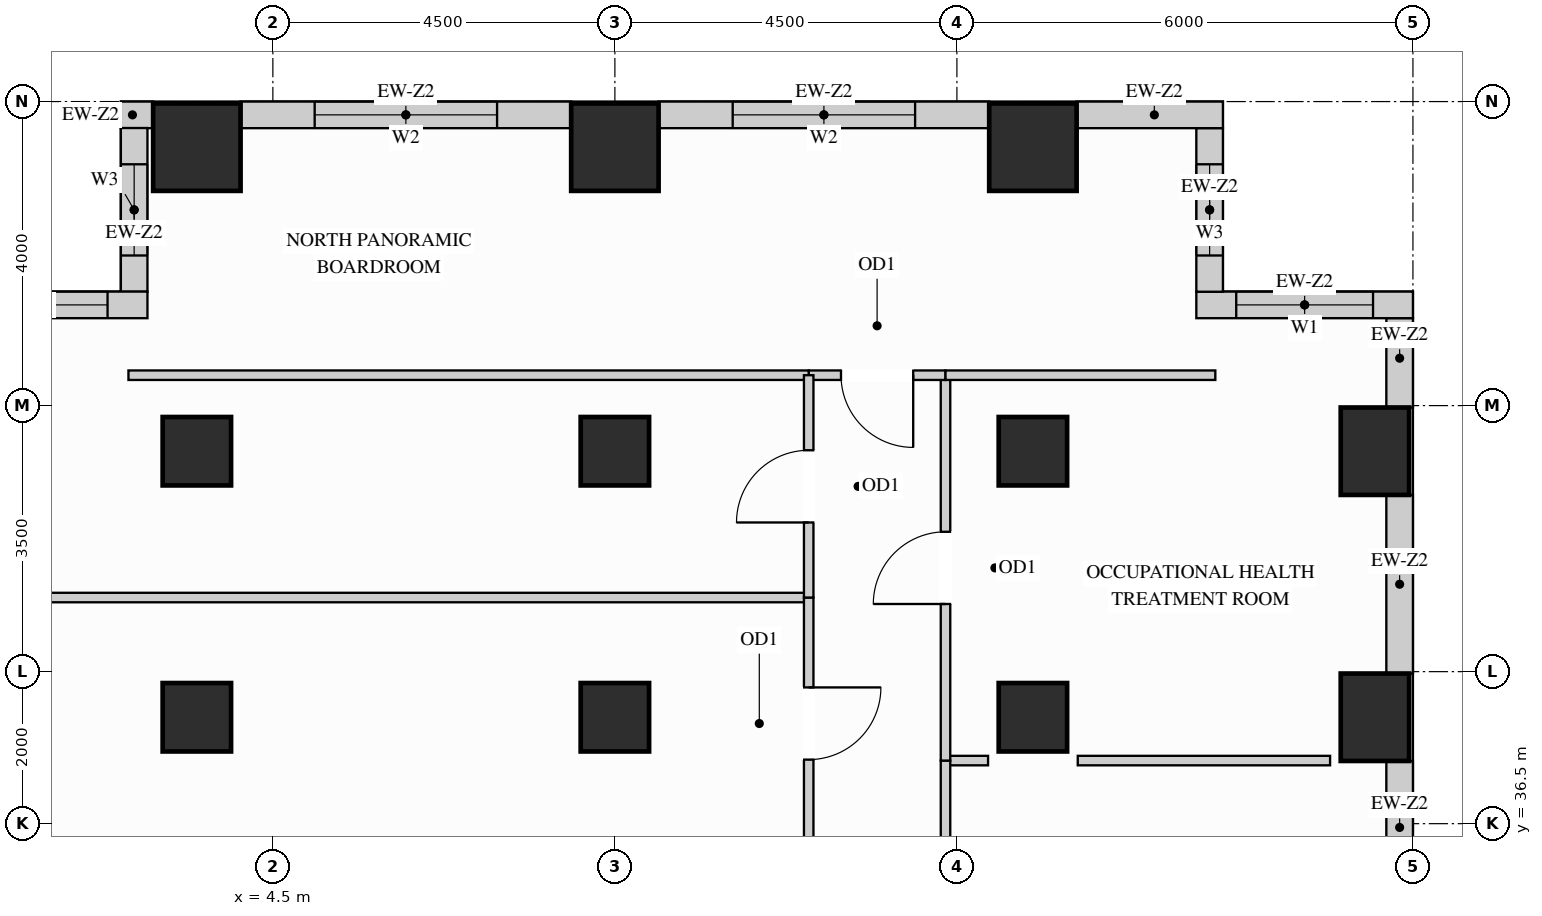
"""IFC4 building model, lengths in metres.
Left out: names, types, materials, properties, quantities, classifications, styles, units other than length and angle.
Written with IfcOpenShell. Run it as: python <this file> out.ifc"""

import sys

from ifc_helpers import new_model, si_unit, direction, frame, frame_2d, origin, origin_2d, place, context, subcontext, project, spatial, rectangle, extrude, source, transform, mapped, element, fill, save


model = new_model("IFC4")
c1 = context("Model", 3, precision=1e-05, world=origin(), true_north=direction((0.0, 1.0)))
c2 = subcontext(c1, "Body", "Model", "MODEL_VIEW")
j1 = project(units=[si_unit("LENGTHUNIT", "METRE"), si_unit("PLANEANGLEUNIT", "RADIAN")], contexts=[c1])
p1 = place(None, origin())
s1 = spatial("IfcSite", under=j1, at=p1, CompositionType="ELEMENT")
p2 = place(p1, origin())
s2 = spatial("IfcBuilding", under=s1, at=p2, CompositionType="ELEMENT")
p3 = place(p2, frame((0.0, 0.0, 117.0)))
s3 = spatial("IfcBuildingStorey", under=s2, at=p3, CompositionType="ELEMENT", Elevation=117.0)
m1 = source(origin(), c2, "Body", "SweptSolid", [
    extrude(rectangle(XDim=0.9, YDim=0.9, at=origin_2d()), origin(), (0.0, 0.0, 1.0), 3.38),
])
for number, where, z_axis, x_axis in (
    (1, (14.5, 37.9, 0.0), (0.0, 0.0, 1.0), (1.0, 0.0, 0.0)),
    (2, (14.5, 41.4, 0.0), (0.0, 0.0, 1.0), (1.0, 0.0, 0.0)),
    (3, (3.5, 37.9, 0.0), (0.0, 0.0, 1.0), (1.0, 0.0, 0.0)),
    (4, (3.5, 41.4, 0.0), (0.0, 0.0, 1.0), (1.0, 0.0, 0.0)),
    (5, (9.0, 37.9, 0.0), (0.0, 0.0, 1.0), (1.0, 0.0, 0.0)),
    (6, (9.0, 41.4, 0.0), (0.0, 0.0, 1.0), (1.0, 0.0, 0.0)),
):
    element("IfcColumn", number, at=place(p3, frame(where, z_axis=z_axis, x_axis=x_axis)), inside=s3, PredefinedType="COLUMN", context=c2, shape_type="MappedRepresentation", body=[
        mapped(m1, transform((0.0, 0.0, 0.0), x_axis=(1.0, 0.0, 0.0), y_axis=(0.0, 1.0, 0.0), z_axis=(0.0, 0.0, 1.0))),
    ])
m2 = source(origin(), c2, "Body", "SweptSolid", [
    extrude(rectangle(XDim=0.9, YDim=1.15, at=origin_2d()), origin(), (0.0, 0.0, 1.0), 3.38),
])
for number, where, z_axis, x_axis in (
    (7, (19.0, 37.9, 0.0), (0.0, 0.0, 1.0), (1.0, 0.0, 0.0)),
    (8, (19.0, 41.4, 0.0), (0.0, 0.0, 1.0), (1.0, 0.0, 0.0)),
):
    element("IfcColumn", number, at=place(p3, frame(where, z_axis=z_axis, x_axis=x_axis)), inside=s3, PredefinedType="COLUMN", context=c2, shape_type="MappedRepresentation", body=[
        mapped(m2, transform((0.0, 0.0, 0.0), x_axis=(1.0, 0.0, 0.0), y_axis=(0.0, 1.0, 0.0), z_axis=(0.0, 0.0, 1.0))),
    ])
m3 = source(origin(), c2, "Body", "SweptSolid", [
    extrude(rectangle(XDim=1.15, YDim=1.15, at=origin_2d()), origin(), (0.0, 0.0, 1.0), 3.38),
])
for number, where, z_axis, x_axis in (
    (9, (14.5, 45.4, 0.0), (0.0, 0.0, 1.0), (1.0, 0.0, 0.0)),
    (10, (3.5, 45.4, 0.0), (0.0, 0.0, 1.0), (1.0, 0.0, 0.0)),
    (11, (9.0, 45.4, 0.0), (0.0, 0.0, 1.0), (1.0, 0.0, 0.0)),
):
    element("IfcColumn", number, at=place(p3, frame(where, z_axis=z_axis, x_axis=x_axis)), inside=s3, PredefinedType="COLUMN", context=c2, shape_type="MappedRepresentation", body=[
        mapped(m3, transform((0.0, 0.0, 0.0), x_axis=(1.0, 0.0, 0.0), y_axis=(0.0, 1.0, 0.0), z_axis=(0.0, 0.0, 1.0))),
    ])
m4 = source(origin(), c2, "Body", "SweptSolid", [
    extrude(rectangle(XDim=1.754, YDim=0.35, at=frame_2d((0.877, 0.0))), origin(), (0.0, 0.0, 1.0), 2.519),
])
p4 = place(p3, frame((19.325, 35.573, 0.0), z_axis=(0.0, 0.0, 1.0), x_axis=(0.0, 1.0, 0.0)))
e12 = element("IfcWall", 12, at=p4, inside=s3, PredefinedType="SOLIDWALL", context=c2, shape_type="MappedRepresentation", body=[
    mapped(m4, transform((0.0, 0.0, 0.0), x_axis=(1.0, 0.0, 0.0), y_axis=(0.0, 1.0, 0.0), z_axis=(0.0, 0.0, 1.0))),
])
m5 = source(origin(), c2, "Body", "SweptSolid", [
    extrude(rectangle(XDim=2.354, YDim=0.35, at=frame_2d((1.177, 0.0))), origin(), (0.0, 0.0, 1.0), 2.519),
])
p5 = place(p3, frame((19.325, 38.473, 0.0), z_axis=(0.0, 0.0, 1.0), x_axis=(0.0, 1.0, 0.0)))
e13 = element("IfcWall", 13, at=p5, inside=s3, PredefinedType="SOLIDWALL", context=c2, shape_type="MappedRepresentation", body=[
    mapped(m5, transform((0.0, 0.0, 0.0), x_axis=(1.0, 0.0, 0.0), y_axis=(0.0, 1.0, 0.0), z_axis=(0.0, 0.0, 1.0))),
])
m6 = source(origin(), c2, "Body", "SweptSolid", [
    extrude(rectangle(XDim=1.179, YDim=0.35, at=frame_2d((0.59, 0.0))), origin(), (0.0, 0.0, 1.0), 3.365),
])
p6 = place(p3, frame((19.325, 41.973, 0.0), z_axis=(0.0, 0.0, 1.0), x_axis=(0.0, 1.0, 0.0)))
e14 = element("IfcWall", 14, at=p6, inside=s3, PredefinedType="SOLIDWALL", context=c2, shape_type="MappedRepresentation", body=[
    mapped(m6, transform((0.0, 0.0, 0.0), x_axis=(1.0, 0.0, 0.0), y_axis=(0.0, 1.0, 0.0), z_axis=(0.0, 0.0, 1.0))),
])
p7 = place(p3, frame((19.5, 43.325, 0.0), z_axis=(0.0, 0.0, 1.0), x_axis=(-1.0, 0.0, 0.0)))
e15 = element("IfcWall", 15, at=p7, inside=s3, PredefinedType="SOLIDWALL", context=c2, shape_type="SweptSolid", body=[
    extrude(rectangle(XDim=2.85, YDim=0.35, at=frame_2d((1.425, 0.0))), origin(), (0.0, 0.0, 1.0), 3.365),
])
p8 = place(p7, frame((0.525, 0.0, 0.78)))
e16 = element("IfcOpeningElement", 16, at=p8, cuts=e15, PredefinedType="OPENING", context=c2, shape_type="SweptSolid", body=[
    extrude(rectangle(XDim=1.8, YDim=2.1, at=frame_2d((0.9, 1.05))), frame((0.0, 0.185, 0.0), z_axis=(0.0, -1.0, 0.0), x_axis=(1.0, 0.0, 0.0)), (0.0, 0.0, 1.0), 0.37),
])
p9 = place(p3, frame((16.825, 43.498, 0.0), z_axis=(0.0, 0.0, 1.0), x_axis=(0.0, 1.0, 0.0)))
e17 = element("IfcWall", 17, at=p9, inside=s3, PredefinedType="SOLIDWALL", context=c2, shape_type="SweptSolid", body=[
    extrude(rectangle(XDim=2.154, YDim=0.35, at=frame_2d((1.077, 0.0))), origin(), (0.0, 0.0, 1.0), 3.365),
])
p10 = place(p9, frame((0.477, 0.0, 0.78)))
e18 = element("IfcOpeningElement", 18, at=p10, cuts=e17, PredefinedType="OPENING", context=c2, shape_type="SweptSolid", body=[
    extrude(rectangle(XDim=1.2, YDim=2.1, at=frame_2d((0.6, 1.05))), frame((0.0, 0.185, 0.0), z_axis=(0.0, -1.0, 0.0), x_axis=(1.0, 0.0, 0.0)), (0.0, 0.0, 1.0), 0.37),
])
m7 = source(origin(), c2, "Body", "SweptSolid", [
    extrude(rectangle(XDim=1.927, YDim=0.35, at=frame_2d((0.963, 0.0))), origin(), (0.0, 0.0, 1.0), 3.365),
])
p11 = place(p3, frame((17.0, 45.825, 0.0), z_axis=(0.0, 0.0, 1.0), x_axis=(-1.0, 0.0, 0.0)))
e19 = element("IfcWall", 19, at=p11, inside=s3, PredefinedType="SOLIDWALL", context=c2, shape_type="MappedRepresentation", body=[
    mapped(m7, transform((0.0, 0.0, 0.0), x_axis=(1.0, 0.0, 0.0), y_axis=(0.0, 1.0, 0.0), z_axis=(0.0, 0.0, 1.0))),
])
p12 = place(p3, frame((13.927, 45.825, 0.0), z_axis=(0.0, 0.0, 1.0), x_axis=(-1.0, 0.0, 0.0)))
e20 = element("IfcWall", 20, at=p12, inside=s3, PredefinedType="SOLIDWALL", context=c2, shape_type="SweptSolid", body=[
    extrude(rectangle(XDim=4.354, YDim=0.35, at=frame_2d((2.177, 0.0))), origin(), (0.0, 0.0, 1.0), 3.365),
])
p13 = place(p12, frame((0.977, 0.0, 0.78)))
e21 = element("IfcOpeningElement", 21, at=p13, cuts=e20, PredefinedType="OPENING", context=c2, shape_type="SweptSolid", body=[
    extrude(rectangle(XDim=2.4, YDim=2.1, at=frame_2d((1.2, 1.05))), frame((0.0, 0.185, 0.0), z_axis=(0.0, -1.0, 0.0), x_axis=(1.0, 0.0, 0.0)), (0.0, 0.0, 1.0), 0.37),
])
p14 = place(p3, frame((8.427, 45.825, 0.0), z_axis=(0.0, 0.0, 1.0), x_axis=(-1.0, 0.0, 0.0)))
e22 = element("IfcWall", 22, at=p14, inside=s3, PredefinedType="SOLIDWALL", context=c2, shape_type="SweptSolid", body=[
    extrude(rectangle(XDim=4.354, YDim=0.35, at=frame_2d((2.177, 0.0))), origin(), (0.0, 0.0, 1.0), 3.365),
])
p15 = place(p14, frame((0.977, 0.0, 0.78)))
e23 = element("IfcOpeningElement", 23, at=p15, cuts=e22, PredefinedType="OPENING", context=c2, shape_type="SweptSolid", body=[
    extrude(rectangle(XDim=2.4, YDim=2.1, at=frame_2d((1.2, 1.05))), frame((0.0, 0.185, 0.0), z_axis=(0.0, -1.0, 0.0), x_axis=(1.0, 0.0, 0.0)), (0.0, 0.0, 1.0), 0.37),
])
m8 = source(origin(), c2, "Body", "SweptSolid", [
    extrude(rectangle(XDim=0.427, YDim=0.35, at=frame_2d((0.213, 0.0))), origin(), (0.0, 0.0, 1.0), 3.365),
])
p16 = place(p3, frame((2.927, 45.825, 0.0), z_axis=(0.0, 0.0, 1.0), x_axis=(-1.0, 0.0, 0.0)))
e24 = element("IfcWall", 24, at=p16, inside=s3, PredefinedType="SOLIDWALL", context=c2, shape_type="MappedRepresentation", body=[
    mapped(m8, transform((0.0, 0.0, 0.0), x_axis=(1.0, 0.0, 0.0), y_axis=(0.0, 1.0, 0.0), z_axis=(0.0, 0.0, 1.0))),
])
p17 = place(p3, frame((2.675, 45.652, 0.0), z_axis=(0.0, 0.0, 1.0), x_axis=(0.0, -1.0, 0.0)))
e25 = element("IfcWall", 25, at=p17, inside=s3, PredefinedType="SOLIDWALL", context=c2, shape_type="SweptSolid", body=[
    extrude(rectangle(XDim=2.154, YDim=0.35, at=frame_2d((1.077, 0.0))), origin(), (0.0, 0.0, 1.0), 3.365),
])
p18 = place(p17, frame((0.477, 0.0, 0.78)))
e26 = element("IfcOpeningElement", 26, at=p18, cuts=e25, PredefinedType="OPENING", context=c2, shape_type="SweptSolid", body=[
    extrude(rectangle(XDim=1.2, YDim=2.1, at=frame_2d((0.6, 1.05))), frame((0.0, 0.185, 0.0), z_axis=(0.0, -1.0, 0.0), x_axis=(1.0, 0.0, 0.0)), (0.0, 0.0, 1.0), 0.37),
])
p19 = place(p3, frame((2.85, 43.325, 0.0), z_axis=(0.0, 0.0, 1.0), x_axis=(-1.0, 0.0, 0.0)))
e27 = element("IfcWall", 27, at=p19, inside=s3, PredefinedType="SOLIDWALL", context=c2, shape_type="SweptSolid", body=[
    extrude(rectangle(XDim=2.85, YDim=0.35, at=frame_2d((1.425, 0.0))), origin(), (0.0, 0.0, 1.0), 3.365),
])
p20 = place(p19, frame((0.525, 0.0, 0.78)))
e28 = element("IfcOpeningElement", 28, at=p20, cuts=e27, PredefinedType="OPENING", context=c2, shape_type="SweptSolid", body=[
    extrude(rectangle(XDim=1.8, YDim=2.1, at=frame_2d((0.9, 1.05))), frame((0.0, 0.185, 0.0), z_axis=(0.0, -1.0, 0.0), x_axis=(1.0, 0.0, 0.0)), (0.0, 0.0, 1.0), 0.37),
])
m9 = source(origin(), c2, "Body", "SweptSolid", [
    extrude(rectangle(XDim=0.56, YDim=0.125, at=frame_2d((0.28, 0.0))), origin(), (0.0, 0.0, 1.0), 3.365),
])
p21 = place(p3, frame((13.35, 37.33, 0.0), z_axis=(0.0, 0.0, 1.0), x_axis=(1.0, 0.0, 0.0)))
e29 = element("IfcWall", 29, at=p21, inside=s3, PredefinedType="PARTITIONING", context=c2, shape_type="MappedRepresentation", body=[
    mapped(m9, transform((0.0, 0.0, 0.0), x_axis=(1.0, 0.0, 0.0), y_axis=(0.0, 1.0, 0.0), z_axis=(0.0, 0.0, 1.0))),
])
m10 = source(origin(), c2, "Body", "SweptSolid", [
    extrude(rectangle(XDim=3.32, YDim=0.125, at=frame_2d((1.66, 0.0))), origin(), (0.0, 0.0, 1.0), 3.365),
])
p22 = place(p3, frame((15.09, 37.33, 0.0), z_axis=(0.0, 0.0, 1.0), x_axis=(1.0, 0.0, 0.0)))
e30 = element("IfcWall", 30, at=p22, inside=s3, PredefinedType="PARTITIONING", context=c2, shape_type="MappedRepresentation", body=[
    mapped(m10, transform((0.0, 0.0, 0.0), x_axis=(1.0, 0.0, 0.0), y_axis=(0.0, 1.0, 0.0), z_axis=(0.0, 0.0, 1.0))),
])
m11 = source(origin(), c2, "Body", "SweptSolid", [
    extrude(rectangle(XDim=11.198, YDim=0.125, at=frame_2d((5.599, 0.0))), origin(), (0.0, 0.0, 1.0), 2.828),
])
p23 = place(p3, frame((0.352, 39.475, 0.0), z_axis=(0.0, 0.0, 1.0), x_axis=(1.0, 0.0, 0.0)))
e31 = element("IfcWall", 31, at=p23, inside=s3, PredefinedType="PARTITIONING", context=c2, shape_type="MappedRepresentation", body=[
    mapped(m11, transform((0.0, 0.0, 0.0), x_axis=(1.0, 0.0, 0.0), y_axis=(0.0, 1.0, 0.0), z_axis=(0.0, 0.0, 1.0))),
])
p24 = place(p3, frame((13.35, 32.65, 0.0), z_axis=(0.0, 0.0, 1.0), x_axis=(0.0, 1.0, 0.0)))
e32 = element("IfcWall", 32, at=p24, inside=s3, PredefinedType="PARTITIONING", context=c2, shape_type="SweptSolid", body=[
    extrude(rectangle(XDim=4.68, YDim=0.125, at=frame_2d((2.34, 0.0))), origin(), (0.0, 0.0, 1.0), 3.365),
])
p25 = place(p24, frame((1.865, 0.0, 0.0)))
e33 = element("IfcOpeningElement", 33, at=p25, cuts=e32, PredefinedType="OPENING", context=c2, shape_type="SweptSolid", body=[
    extrude(rectangle(XDim=0.95, YDim=2.15, at=frame_2d((0.475, 1.075))), frame((0.0, 0.073, 0.0), z_axis=(0.0, -1.0, 0.0), x_axis=(1.0, 0.0, 0.0)), (0.0, 0.0, 1.0), 0.145),
])
p26 = place(p3, frame((13.35, 37.33, 0.0), z_axis=(0.0, 0.0, 1.0), x_axis=(0.0, 1.0, 0.0)))
e34 = element("IfcWall", 34, at=p26, inside=s3, PredefinedType="PARTITIONING", context=c2, shape_type="SweptSolid", body=[
    extrude(rectangle(XDim=5.07, YDim=0.125, at=frame_2d((2.535, 0.0))), origin(), (0.0, 0.0, 1.0), 3.365),
])
p27 = place(p26, frame((2.06, 0.0, 0.0)))
e35 = element("IfcOpeningElement", 35, at=p27, cuts=e34, PredefinedType="OPENING", context=c2, shape_type="SweptSolid", body=[
    extrude(rectangle(XDim=0.95, YDim=2.15, at=frame_2d((0.475, 1.075))), frame((0.0, 0.073, 0.0), z_axis=(0.0, -1.0, 0.0), x_axis=(1.0, 0.0, 0.0)), (0.0, 0.0, 1.0), 0.145),
])
p28 = place(p3, frame((11.55, 42.4, 0.0), z_axis=(0.0, 0.0, 1.0), x_axis=(1.0, 0.0, 0.0)))
e36 = element("IfcWall", 36, at=p28, inside=s3, PredefinedType="PARTITIONING", context=c2, shape_type="SweptSolid", body=[
    extrude(rectangle(XDim=1.8, YDim=0.125, at=frame_2d((0.9, 0.0))), origin(), (0.0, 0.0, 1.0), 3.365),
])
p29 = place(p28, frame((0.425, 0.0, 0.0)))
e37 = element("IfcOpeningElement", 37, at=p29, cuts=e36, PredefinedType="OPENING", context=c2, shape_type="SweptSolid", body=[
    extrude(rectangle(XDim=0.95, YDim=2.15, at=frame_2d((0.475, 1.075))), frame((0.0, 0.073, 0.0), z_axis=(0.0, -1.0, 0.0), x_axis=(1.0, 0.0, 0.0)), (0.0, 0.0, 1.0), 0.145),
])
m12 = source(origin(), c2, "Body", "SweptSolid", [
    extrude(rectangle(XDim=3.55, YDim=0.125, at=frame_2d((1.775, 0.0))), origin(), (0.0, 0.0, 1.0), 3.365),
])
p30 = place(p3, frame((13.35, 42.4, 0.0), z_axis=(0.0, 0.0, 1.0), x_axis=(1.0, 0.0, 0.0)))
e38 = element("IfcWall", 38, at=p30, inside=s3, PredefinedType="PARTITIONING", context=c2, shape_type="MappedRepresentation", body=[
    mapped(m12, transform((0.0, 0.0, 0.0), x_axis=(1.0, 0.0, 0.0), y_axis=(0.0, 1.0, 0.0), z_axis=(0.0, 0.0, 1.0))),
])
m13 = source(origin(), c2, "Body", "SweptSolid", [
    extrude(rectangle(XDim=8.95, YDim=0.125, at=frame_2d((4.475, 0.0))), origin(), (0.0, 0.0, 1.0), 3.365),
])
p31 = place(p3, frame((2.6, 42.4, 0.0), z_axis=(0.0, 0.0, 1.0), x_axis=(1.0, 0.0, 0.0)))
e39 = element("IfcWall", 39, at=p31, inside=s3, PredefinedType="PARTITIONING", context=c2, shape_type="MappedRepresentation", body=[
    mapped(m13, transform((0.0, 0.0, 0.0), x_axis=(1.0, 0.0, 0.0), y_axis=(0.0, 1.0, 0.0), z_axis=(0.0, 0.0, 1.0))),
])
p32 = place(p3, frame((11.55, 36.16, 0.0), z_axis=(0.0, 0.0, 1.0), x_axis=(0.0, 1.0, 0.0)))
e40 = element("IfcWall", 40, at=p32, inside=s3, PredefinedType="PARTITIONING", context=c2, shape_type="SweptSolid", body=[
    extrude(rectangle(XDim=3.315, YDim=0.125, at=frame_2d((1.658, 0.0))), origin(), (0.0, 0.0, 1.0), 3.365),
])
p33 = place(p32, frame((1.183, 0.0, 0.0)))
e41 = element("IfcOpeningElement", 41, at=p33, cuts=e40, PredefinedType="OPENING", context=c2, shape_type="SweptSolid", body=[
    extrude(rectangle(XDim=0.95, YDim=2.15, at=frame_2d((0.475, 1.075))), frame((0.0, 0.073, 0.0), z_axis=(0.0, -1.0, 0.0), x_axis=(1.0, 0.0, 0.0)), (0.0, 0.0, 1.0), 0.145),
])
p34 = place(p3, frame((11.55, 39.475, 0.0), z_axis=(0.0, 0.0, 1.0), x_axis=(0.0, 1.0, 0.0)))
e42 = element("IfcWall", 42, at=p34, inside=s3, PredefinedType="PARTITIONING", context=c2, shape_type="SweptSolid", body=[
    extrude(rectangle(XDim=2.925, YDim=0.125, at=frame_2d((1.462, 0.0))), origin(), (0.0, 0.0, 1.0), 3.365),
])
p35 = place(p34, frame((0.988, 0.0, 0.0)))
e43 = element("IfcOpeningElement", 43, at=p35, cuts=e42, PredefinedType="OPENING", context=c2, shape_type="SweptSolid", body=[
    extrude(rectangle(XDim=0.95, YDim=2.15, at=frame_2d((0.475, 1.075))), frame((0.0, 0.073, 0.0), z_axis=(0.0, -1.0, 0.0), x_axis=(1.0, 0.0, 0.0)), (0.0, 0.0, 1.0), 0.145),
])
m14 = source(origin(), c2, "Body", "SweptSolid", [
    extrude(rectangle(XDim=0.95, YDim=2.15, at=frame_2d((0.475, 1.075))), frame((0.0, 0.025, 0.0), z_axis=(0.0, -1.0, 0.0), x_axis=(1.0, 0.0, 0.0)), (0.0, 0.0, 1.0), 0.05),
])
p36 = place(p27, origin())
e44 = element("IfcDoor", 44, at=p36, inside=s3, OperationType="SINGLE_SWING_LEFT", PredefinedType="DOOR", context=c2, shape_type="MappedRepresentation", body=[
    mapped(m14, transform((0.0, 0.0, 0.0), x_axis=(1.0, 0.0, 0.0), y_axis=(0.0, 1.0, 0.0), z_axis=(0.0, 0.0, 1.0))),
])
fill(e35, e44)
p37 = place(p29, origin())
e45 = element("IfcDoor", 45, at=p37, inside=s3, OperationType="SINGLE_SWING_RIGHT", PredefinedType="DOOR", context=c2, shape_type="MappedRepresentation", body=[
    mapped(m14, transform((0.0, 0.0, 0.0), x_axis=(1.0, 0.0, 0.0), y_axis=(0.0, 1.0, 0.0), z_axis=(0.0, 0.0, 1.0))),
])
fill(e37, e45)
p38 = place(p33, origin())
e46 = element("IfcDoor", 46, at=p38, inside=s3, OperationType="SINGLE_SWING_RIGHT", PredefinedType="DOOR", context=c2, shape_type="MappedRepresentation", body=[
    mapped(m14, transform((0.0, 0.0, 0.0), x_axis=(1.0, 0.0, 0.0), y_axis=(0.0, 1.0, 0.0), z_axis=(0.0, 0.0, 1.0))),
])
fill(e41, e46)
p39 = place(p35, origin())
e47 = element("IfcDoor", 47, at=p39, inside=s3, OperationType="SINGLE_SWING_LEFT", PredefinedType="DOOR", context=c2, shape_type="MappedRepresentation", body=[
    mapped(m14, transform((0.0, 0.0, 0.0), x_axis=(1.0, 0.0, 0.0), y_axis=(0.0, 1.0, 0.0), z_axis=(0.0, 0.0, 1.0))),
])
fill(e43, e47)
m15 = source(origin(), c2, "Body", "SweptSolid", [
    extrude(rectangle(XDim=1.8, YDim=2.1, at=frame_2d((0.9, 1.05))), frame((0.0, 0.03, 0.0), z_axis=(0.0, -1.0, 0.0), x_axis=(1.0, 0.0, 0.0)), (0.0, 0.0, 1.0), 0.06),
])
p40 = place(p8, origin())
e48 = element("IfcWindow", 48, at=p40, inside=s3, PartitioningType="SINGLE_PANEL", PredefinedType="WINDOW", context=c2, shape_type="MappedRepresentation", body=[
    mapped(m15, transform((0.0, 0.0, 0.0), x_axis=(1.0, 0.0, 0.0), y_axis=(0.0, 1.0, 0.0), z_axis=(0.0, 0.0, 1.0))),
])
fill(e16, e48)
p41 = place(p20, origin())
e49 = element("IfcWindow", 49, at=p41, inside=s3, PartitioningType="SINGLE_PANEL", PredefinedType="WINDOW", context=c2, shape_type="MappedRepresentation", body=[
    mapped(m15, transform((0.0, 0.0, 0.0), x_axis=(1.0, 0.0, 0.0), y_axis=(0.0, 1.0, 0.0), z_axis=(0.0, 0.0, 1.0))),
])
fill(e28, e49)
m16 = source(origin(), c2, "Body", "SweptSolid", [
    extrude(rectangle(XDim=2.4, YDim=2.1, at=frame_2d((1.2, 1.05))), frame((0.0, 0.03, 0.0), z_axis=(0.0, -1.0, 0.0), x_axis=(1.0, 0.0, 0.0)), (0.0, 0.0, 1.0), 0.06),
])
p42 = place(p13, origin())
e50 = element("IfcWindow", 50, at=p42, inside=s3, PartitioningType="SINGLE_PANEL", PredefinedType="WINDOW", context=c2, shape_type="MappedRepresentation", body=[
    mapped(m16, transform((0.0, 0.0, 0.0), x_axis=(1.0, 0.0, 0.0), y_axis=(0.0, 1.0, 0.0), z_axis=(0.0, 0.0, 1.0))),
])
fill(e21, e50)
p43 = place(p15, origin())
e51 = element("IfcWindow", 51, at=p43, inside=s3, PartitioningType="SINGLE_PANEL", PredefinedType="WINDOW", context=c2, shape_type="MappedRepresentation", body=[
    mapped(m16, transform((0.0, 0.0, 0.0), x_axis=(1.0, 0.0, 0.0), y_axis=(0.0, 1.0, 0.0), z_axis=(0.0, 0.0, 1.0))),
])
fill(e23, e51)
m17 = source(origin(), c2, "Body", "SweptSolid", [
    extrude(rectangle(XDim=1.2, YDim=2.1, at=frame_2d((0.6, 1.05))), frame((0.0, 0.03, 0.0), z_axis=(0.0, -1.0, 0.0), x_axis=(1.0, 0.0, 0.0)), (0.0, 0.0, 1.0), 0.06),
])
p44 = place(p10, origin())
e52 = element("IfcWindow", 52, at=p44, inside=s3, PartitioningType="SINGLE_PANEL", PredefinedType="WINDOW", context=c2, shape_type="MappedRepresentation", body=[
    mapped(m17, transform((0.0, 0.0, 0.0), x_axis=(1.0, 0.0, 0.0), y_axis=(0.0, 1.0, 0.0), z_axis=(0.0, 0.0, 1.0))),
])
fill(e18, e52)
p45 = place(p18, origin())
e53 = element("IfcWindow", 53, at=p45, inside=s3, PartitioningType="SINGLE_PANEL", PredefinedType="WINDOW", context=c2, shape_type="MappedRepresentation", body=[
    mapped(m17, transform((0.0, 0.0, 0.0), x_axis=(1.0, 0.0, 0.0), y_axis=(0.0, 1.0, 0.0), z_axis=(0.0, 0.0, 1.0))),
])
fill(e26, e53)
save(model, sys.argv[1])
